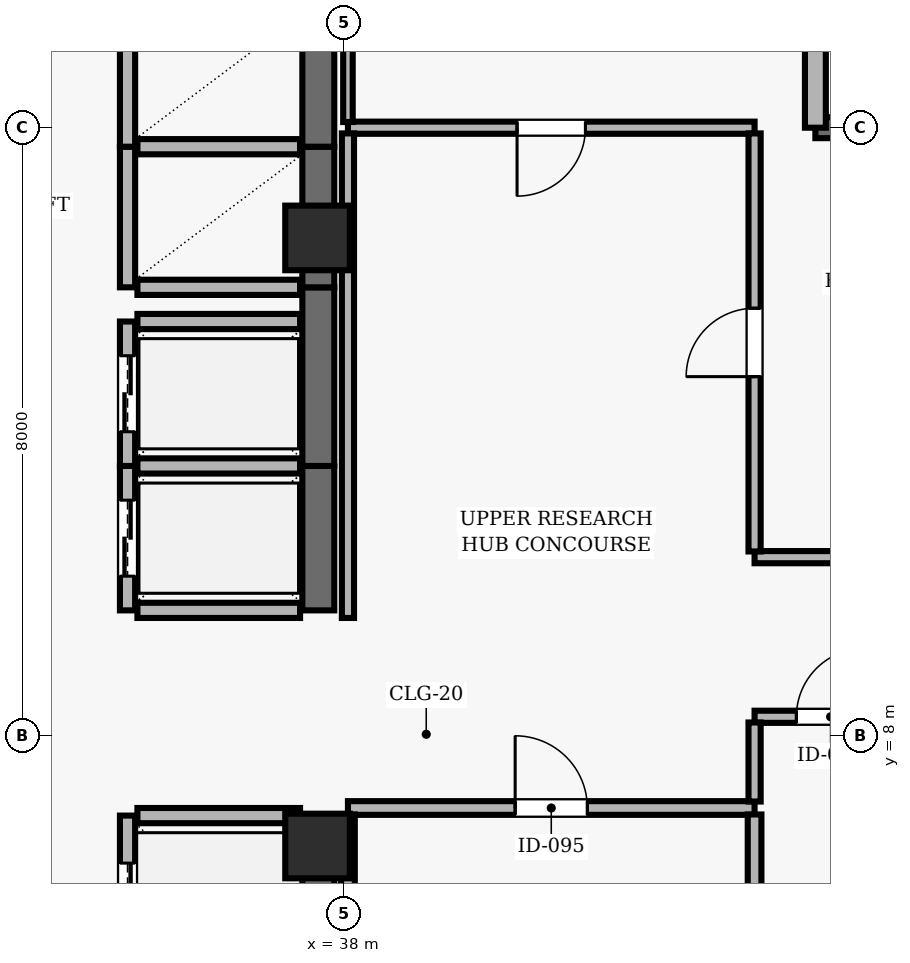
"""IFC4 building model, lengths in metres.
Left out: names, types, materials, properties, quantities, classifications, styles, units other than length and angle.
Written with IfcOpenShell. Run it as: python <this file> out.ifc"""

import sys

from ifc_helpers import new_model, si_unit, direction, frame, frame_2d, origin, origin_2d, place, context, subcontext, project, spatial, rectangle, extrude, element, fill, save


model = new_model("IFC4")
c1 = context("Model", 3, precision=1e-05, world=origin(), true_north=direction((0.0, 1.0)))
c2 = subcontext(c1, "Body", "Model", "MODEL_VIEW")
j1 = project(units=[si_unit("LENGTHUNIT", "METRE"), si_unit("PLANEANGLEUNIT", "RADIAN")], contexts=[c1])
p1 = place(None, origin())
s1 = spatial("IfcSite", under=j1, at=p1, CompositionType="ELEMENT")
p2 = place(p1, origin())
s2 = spatial("IfcBuilding", under=s1, at=p2, CompositionType="ELEMENT")
p3 = place(p2, frame((0.0, 0.0, 271.6)))
s3 = spatial("IfcBuildingStorey", under=s2, at=p3, CompositionType="ELEMENT", Elevation=271.6)
for number, where, z_axis, x_axis in (
    (1, (37.65, 6.55, 0.0), (0.0, 0.0, 1.0), (1.0, 0.0, 0.0)),
    (2, (37.65, 14.55, 0.0), (0.0, 0.0, 1.0), (1.0, 0.0, 0.0)),
):
    element("IfcColumn", number, at=place(p3, frame(where, z_axis=z_axis, x_axis=x_axis)), inside=s3, PredefinedType="COLUMN", context=c2, shape_type="SweptSolid", body=[
        extrude(rectangle(XDim=0.85, YDim=0.85, at=origin_2d()), origin(), (0.0, 0.0, 1.0), 3.9),
    ])
p4 = place(p3, frame((57.3, 16.0, 0.0), z_axis=(0.0, 0.0, 1.0), x_axis=(-1.0, 0.0, 0.0)))
e3 = element("IfcWall", 3, at=p4, inside=s3, PredefinedType="SOLIDWALL", context=c2, shape_type="SweptSolid", body=[
    extrude(rectangle(XDim=13.1, YDim=0.275, at=frame_2d((6.55, 0.0))), origin(), (0.0, 0.0, 1.0), 3.69),
])
p5 = place(p4, frame((7.05, 0.0, 0.0)))
e4 = element("IfcOpeningElement", 4, at=p5, cuts=e3, PredefinedType="OPENING", context=c2, shape_type="SweptSolid", body=[
    extrude(rectangle(XDim=1.0, YDim=2.2, at=frame_2d((0.5, 1.1))), frame((0.0, 0.147, 0.0), z_axis=(0.0, -1.0, 0.0), x_axis=(1.0, 0.0, 0.0)), (0.0, 0.0, 1.0), 0.295),
])
p6 = place(p4, frame((2.075, 0.0, 0.9)))
e5 = element("IfcOpeningElement", 5, at=p6, cuts=e3, PredefinedType="OPENING", context=c2, shape_type="SweptSolid", body=[
    extrude(rectangle(XDim=2.4, YDim=2.2, at=frame_2d((1.2, 1.1))), frame((0.0, 0.147, 0.0), z_axis=(0.0, -1.0, 0.0), x_axis=(1.0, 0.0, 0.0)), (0.0, 0.0, 1.0), 0.295),
])
p7 = place(p3, frame((44.2, 16.0, 0.0), z_axis=(0.0, 0.0, 1.0), x_axis=(0.0, 1.0, 0.0)))
e6 = element("IfcWall", 6, at=p7, inside=s3, PredefinedType="SOLIDWALL", context=c2, shape_type="SweptSolid", body=[
    extrude(rectangle(XDim=5.4, YDim=0.275, at=frame_2d((2.7, 0.0))), origin(), (0.0, 0.0, 1.0), 3.69),
])
p8 = place(p7, frame((1.2, 0.0, 0.9)))
e7 = element("IfcOpeningElement", 7, at=p8, cuts=e6, PredefinedType="OPENING", context=c2, shape_type="SweptSolid", body=[
    extrude(rectangle(XDim=3.0, YDim=2.2, at=frame_2d((1.5, 1.1))), frame((0.0, 0.147, 0.0), z_axis=(0.0, -1.0, 0.0), x_axis=(1.0, 0.0, 0.0)), (0.0, 0.0, 1.0), 0.295),
])
p9 = place(p3, frame((35.15, 6.95, 0.0), z_axis=(0.0, 0.0, 1.0), x_axis=(0.0, -1.0, 0.0)))
e8 = element("IfcWall", 8, at=p9, inside=s3, PredefinedType="SOLIDWALL", context=c2, shape_type="SweptSolid", body=[
    extrude(rectangle(XDim=2.25, YDim=0.2, at=frame_2d((1.125, 0.0))), origin(), (0.0, 0.0, 1.0), 3.69),
])
p10 = place(p9, frame((0.625, 0.0, 0.0)))
e9 = element("IfcOpeningElement", 9, at=p10, cuts=e8, PredefinedType="OPENING", context=c2, shape_type="SweptSolid", body=[
    extrude(rectangle(XDim=1.0, YDim=2.1, at=frame_2d((0.5, 1.05))), frame((0.0, 0.11, 0.0), z_axis=(0.0, -1.0, 0.0), x_axis=(1.0, 0.0, 0.0)), (0.0, 0.0, 1.0), 0.22),
])
p11 = place(p3, frame((37.66, 4.7, 0.0), z_axis=(0.0, 0.0, 1.0), x_axis=(0.0, 1.0, 0.0)))
e10 = element("IfcWall", 10, at=p11, inside=s3, PredefinedType="SHEAR", context=c2, shape_type="SweptSolid", body=[
    extrude(rectangle(XDim=2.25, YDim=0.42, at=frame_2d((1.125, 0.0))), origin(), (0.0, 0.0, 1.0), 3.69),
])
p12 = place(p3, frame((37.42, 6.95, 0.0), z_axis=(0.0, 0.0, 1.0), x_axis=(-1.0, 0.0, 0.0)))
e11 = element("IfcWall", 11, at=p12, inside=s3, PredefinedType="SOLIDWALL", context=c2, shape_type="SweptSolid", body=[
    extrude(rectangle(XDim=2.14, YDim=0.2, at=frame_2d((1.07, 0.0))), origin(), (0.0, 0.0, 1.0), 3.69),
])
p13 = place(p3, frame((35.15, 11.55, 0.0), z_axis=(0.0, 0.0, 1.0), x_axis=(0.0, -1.0, 0.0)))
e12 = element("IfcWall", 12, at=p13, inside=s3, PredefinedType="SOLIDWALL", context=c2, shape_type="SweptSolid", body=[
    extrude(rectangle(XDim=1.9, YDim=0.2, at=frame_2d((0.95, 0.0))), origin(), (0.0, 0.0, 1.0), 3.69),
])
p14 = place(p13, frame((0.45, 0.0, 0.0)))
e13 = element("IfcOpeningElement", 13, at=p14, cuts=e12, PredefinedType="OPENING", context=c2, shape_type="SweptSolid", body=[
    extrude(rectangle(XDim=1.0, YDim=2.1, at=frame_2d((0.5, 1.05))), frame((0.0, 0.11, 0.0), z_axis=(0.0, -1.0, 0.0), x_axis=(1.0, 0.0, 0.0)), (0.0, 0.0, 1.0), 0.22),
])
p15 = place(p3, frame((37.66, 9.65, 0.0), z_axis=(0.0, 0.0, 1.0), x_axis=(0.0, 1.0, 0.0)))
e14 = element("IfcWall", 14, at=p15, inside=s3, PredefinedType="SHEAR", context=c2, shape_type="SweptSolid", body=[
    extrude(rectangle(XDim=1.9, YDim=0.42, at=frame_2d((0.95, 0.0))), origin(), (0.0, 0.0, 1.0), 3.69),
])
for number, where, z_axis, x_axis in (
    (15, (35.28, 9.65, 0.0), (0.0, 0.0, 1.0), (1.0, 0.0, 0.0)),
    (16, (37.42, 11.55, 0.0), (0.0, 0.0, 1.0), (-1.0, 0.0, 0.0)),
):
    element("IfcWall", number, at=place(p3, frame(where, z_axis=z_axis, x_axis=x_axis)), inside=s3, PredefinedType="SOLIDWALL", context=c2, shape_type="SweptSolid", body=[
        extrude(rectangle(XDim=2.14, YDim=0.2, at=frame_2d((1.07, 0.0))), origin(), (0.0, 0.0, 1.0), 3.69),
    ])
p16 = place(p3, frame((35.15, 13.45, 0.0), z_axis=(0.0, 0.0, 1.0), x_axis=(0.0, -1.0, 0.0)))
e17 = element("IfcWall", 17, at=p16, inside=s3, PredefinedType="SOLIDWALL", context=c2, shape_type="SweptSolid", body=[
    extrude(rectangle(XDim=1.9, YDim=0.2, at=frame_2d((0.95, 0.0))), origin(), (0.0, 0.0, 1.0), 3.69),
])
p17 = place(p16, frame((0.45, 0.0, 0.0)))
e18 = element("IfcOpeningElement", 18, at=p17, cuts=e17, PredefinedType="OPENING", context=c2, shape_type="SweptSolid", body=[
    extrude(rectangle(XDim=1.0, YDim=2.1, at=frame_2d((0.5, 1.05))), frame((0.0, 0.11, 0.0), z_axis=(0.0, -1.0, 0.0), x_axis=(1.0, 0.0, 0.0)), (0.0, 0.0, 1.0), 0.22),
])
p18 = place(p3, frame((37.66, 11.55, 0.0), z_axis=(0.0, 0.0, 1.0), x_axis=(0.0, 1.0, 0.0)))
e19 = element("IfcWall", 19, at=p18, inside=s3, PredefinedType="SHEAR", context=c2, shape_type="SweptSolid", body=[
    extrude(rectangle(XDim=2.35, YDim=0.42, at=frame_2d((1.175, 0.0))), origin(), (0.0, 0.0, 1.0), 3.69),
])
p19 = place(p3, frame((37.42, 13.45, 0.0), z_axis=(0.0, 0.0, 1.0), x_axis=(-1.0, 0.0, 0.0)))
e20 = element("IfcWall", 20, at=p19, inside=s3, PredefinedType="SOLIDWALL", context=c2, shape_type="SweptSolid", body=[
    extrude(rectangle(XDim=2.14, YDim=0.2, at=frame_2d((1.07, 0.0))), origin(), (0.0, 0.0, 1.0), 3.69),
])
p20 = place(p3, frame((35.15, 15.75, 0.0), z_axis=(0.0, 0.0, 1.0), x_axis=(0.0, -1.0, 0.0)))
e21 = element("IfcWall", 21, at=p20, inside=s3, PredefinedType="SOLIDWALL", context=c2, shape_type="SweptSolid", body=[
    extrude(rectangle(XDim=1.85, YDim=0.2, at=frame_2d((0.925, 0.0))), origin(), (0.0, 0.0, 1.0), 3.69),
])
p21 = place(p3, frame((37.66, 13.9, 0.0), z_axis=(0.0, 0.0, 1.0), x_axis=(0.0, 1.0, 0.0)))
e22 = element("IfcWall", 22, at=p21, inside=s3, PredefinedType="SHEAR", context=c2, shape_type="SweptSolid", body=[
    extrude(rectangle(XDim=1.85, YDim=0.42, at=frame_2d((0.925, 0.0))), origin(), (0.0, 0.0, 1.0), 3.69),
])
for number, where, z_axis, x_axis in (
    (23, (35.28, 13.9, 0.0), (0.0, 0.0, 1.0), (1.0, 0.0, 0.0)),
    (24, (37.42, 15.75, 0.0), (0.0, 0.0, 1.0), (-1.0, 0.0, 0.0)),
):
    element("IfcWall", number, at=place(p3, frame(where, z_axis=z_axis, x_axis=x_axis)), inside=s3, PredefinedType="SOLIDWALL", context=c2, shape_type="SweptSolid", body=[
        extrude(rectangle(XDim=2.14, YDim=0.2, at=frame_2d((1.07, 0.0))), origin(), (0.0, 0.0, 1.0), 3.69),
    ])
p22 = place(p3, frame((35.15, 17.6, 0.0), z_axis=(0.0, 0.0, 1.0), x_axis=(0.0, -1.0, 0.0)))
e25 = element("IfcWall", 25, at=p22, inside=s3, PredefinedType="SOLIDWALL", context=c2, shape_type="SweptSolid", body=[
    extrude(rectangle(XDim=1.85, YDim=0.2, at=frame_2d((0.925, 0.0))), origin(), (0.0, 0.0, 1.0), 3.69),
])
p23 = place(p3, frame((37.66, 15.75, 0.0), z_axis=(0.0, 0.0, 1.0), x_axis=(0.0, 1.0, 0.0)))
e26 = element("IfcWall", 26, at=p23, inside=s3, PredefinedType="SHEAR", context=c2, shape_type="SweptSolid", body=[
    extrude(rectangle(XDim=1.85, YDim=0.42, at=frame_2d((0.925, 0.0))), origin(), (0.0, 0.0, 1.0), 3.69),
])
p24 = place(p3, frame((38.05, 7.05, 0.0), z_axis=(0.0, 0.0, 1.0), x_axis=(1.0, 0.0, 0.0)))
e27 = element("IfcWall", 27, at=p24, inside=s3, PredefinedType="PARTITIONING", context=c2, shape_type="SweptSolid", body=[
    extrude(rectangle(XDim=5.35, YDim=0.18, at=frame_2d((2.675, 0.0))), origin(), (0.0, 0.0, 1.0), 3.69),
])
p25 = place(p24, frame((2.2, 0.0, 0.0)))
e28 = element("IfcOpeningElement", 28, at=p25, cuts=e27, PredefinedType="OPENING", context=c2, shape_type="SweptSolid", body=[
    extrude(rectangle(XDim=0.95, YDim=2.1, at=frame_2d((0.475, 1.05))), frame((0.0, 0.1, 0.0), z_axis=(0.0, -1.0, 0.0), x_axis=(1.0, 0.0, 0.0)), (0.0, 0.0, 1.0), 0.2),
])
p26 = place(p3, frame((43.4, 8.25, 0.0), z_axis=(0.0, 0.0, 1.0), x_axis=(1.0, 0.0, 0.0)))
e29 = element("IfcWall", 29, at=p26, inside=s3, PredefinedType="PARTITIONING", context=c2, shape_type="SweptSolid", body=[
    extrude(rectangle(XDim=4.1, YDim=0.16, at=frame_2d((2.05, 0.0))), origin(), (0.0, 0.0, 1.0), 3.221),
])
p27 = place(p26, frame((0.55, 0.0, 0.0)))
e30 = element("IfcOpeningElement", 30, at=p27, cuts=e29, PredefinedType="OPENING", context=c2, shape_type="SweptSolid", body=[
    extrude(rectangle(XDim=0.9, YDim=2.1, at=frame_2d((0.45, 1.05))), frame((0.0, 0.09, 0.0), z_axis=(0.0, -1.0, 0.0), x_axis=(1.0, 0.0, 0.0)), (0.0, 0.0, 1.0), 0.18),
])
p28 = place(p3, frame((43.4, 16.0, 0.0), z_axis=(0.0, 0.0, 1.0), x_axis=(-1.0, 0.0, 0.0)))
e31 = element("IfcWall", 31, at=p28, inside=s3, PredefinedType="PARTITIONING", context=c2, shape_type="SweptSolid", body=[
    extrude(rectangle(XDim=5.35, YDim=0.16, at=frame_2d((2.675, 0.0))), origin(), (0.0, 0.0, 1.0), 3.39),
])
p29 = place(p28, frame((2.225, 0.0, 0.0)))
e32 = element("IfcOpeningElement", 32, at=p29, cuts=e31, PredefinedType="OPENING", context=c2, shape_type="SweptSolid", body=[
    extrude(rectangle(XDim=0.9, YDim=2.1, at=frame_2d((0.45, 1.05))), frame((0.0, 0.09, 0.0), z_axis=(0.0, -1.0, 0.0), x_axis=(1.0, 0.0, 0.0)), (0.0, 0.0, 1.0), 0.18),
])
p30 = place(p3, frame((47.5, 10.35, 0.0), z_axis=(0.0, 0.0, 1.0), x_axis=(-1.0, 0.0, 0.0)))
e33 = element("IfcWall", 33, at=p30, inside=s3, PredefinedType="PARTITIONING", context=c2, shape_type="SweptSolid", body=[
    extrude(rectangle(XDim=4.1, YDim=0.16, at=frame_2d((2.05, 0.0))), origin(), (0.0, 0.0, 1.0), 3.372),
])
p31 = place(p3, frame((38.05, 6.965, 0.0), z_axis=(0.0, 0.0, 1.0), x_axis=(0.0, -1.0, 0.0)))
e34 = element("IfcWall", 34, at=p31, inside=s3, PredefinedType="PARTITIONING", context=c2, shape_type="SweptSolid", body=[
    extrude(rectangle(XDim=6.832, YDim=0.18, at=frame_2d((3.416, 0.0))), origin(), (0.0, 0.0, 1.0), 3.221),
])
p32 = place(p3, frame((38.05, 15.925, 0.0), z_axis=(0.0, 0.0, 1.0), x_axis=(0.0, -1.0, 0.0)))
e35 = element("IfcWall", 35, at=p32, inside=s3, PredefinedType="PARTITIONING", context=c2, shape_type="SweptSolid", body=[
    extrude(rectangle(XDim=6.375, YDim=0.16, at=frame_2d((3.188, 0.0))), origin(), (0.0, 0.0, 1.0), 3.221),
])
p33 = place(p3, frame((38.05, 22.468, 0.0), z_axis=(0.0, 0.0, 1.0), x_axis=(0.0, -1.0, 0.0)))
e36 = element("IfcWall", 36, at=p33, inside=s3, PredefinedType="PARTITIONING", context=c2, shape_type="SweptSolid", body=[
    extrude(rectangle(XDim=6.393, YDim=0.125, at=frame_2d((3.197, 0.0))), origin(), (0.0, 0.0, 1.0), 3.221),
])
p34 = place(p3, frame((43.4, 0.133, 0.0), z_axis=(0.0, 0.0, 1.0), x_axis=(0.0, 1.0, 0.0)))
e37 = element("IfcWall", 37, at=p34, inside=s3, PredefinedType="PARTITIONING", context=c2, shape_type="SweptSolid", body=[
    extrude(rectangle(XDim=6.832, YDim=0.18, at=frame_2d((3.416, 0.0))), origin(), (0.0, 0.0, 1.0), 3.69),
])
p35 = place(p3, frame((43.4, 7.135, 0.0), z_axis=(0.0, 0.0, 1.0), x_axis=(0.0, 1.0, 0.0)))
e38 = element("IfcWall", 38, at=p35, inside=s3, PredefinedType="PARTITIONING", context=c2, shape_type="SweptSolid", body=[
    extrude(rectangle(XDim=1.04, YDim=0.16, at=frame_2d((0.52, 0.0))), origin(), (0.0, 0.0, 1.0), 3.69),
])
p36 = place(p3, frame((43.4, 10.425, 0.0), z_axis=(0.0, 0.0, 1.0), x_axis=(0.0, 1.0, 0.0)))
e39 = element("IfcWall", 39, at=p36, inside=s3, PredefinedType="PARTITIONING", context=c2, shape_type="SweptSolid", body=[
    extrude(rectangle(XDim=5.5, YDim=0.16, at=frame_2d((2.75, 0.0))), origin(), (0.0, 0.0, 1.0), 3.69),
])
p37 = place(p36, frame((2.3, 0.0, 0.0)))
e40 = element("IfcOpeningElement", 40, at=p37, cuts=e39, PredefinedType="OPENING", context=c2, shape_type="SweptSolid", body=[
    extrude(rectangle(XDim=0.9, YDim=2.1, at=frame_2d((0.45, 1.05))), frame((0.0, 0.09, 0.0), z_axis=(0.0, -1.0, 0.0), x_axis=(1.0, 0.0, 0.0)), (0.0, 0.0, 1.0), 0.18),
])
p38 = place(p10, origin())
e41 = element("IfcDoor", 41, at=p38, inside=s3, OperationType="DOUBLE_DOOR_SLIDING", PredefinedType="DOOR", context=c2, shape_type="SweptSolid", body=[
    extrude(rectangle(XDim=1.0, YDim=2.1, at=frame_2d((0.5, 1.05))), frame((0.0, 0.025, 0.0), z_axis=(0.0, -1.0, 0.0), x_axis=(1.0, 0.0, 0.0)), (0.0, 0.0, 1.0), 0.05),
])
fill(e9, e41)
p39 = place(p14, origin())
e42 = element("IfcDoor", 42, at=p39, inside=s3, OperationType="DOUBLE_DOOR_SLIDING", PredefinedType="DOOR", context=c2, shape_type="SweptSolid", body=[
    extrude(rectangle(XDim=1.0, YDim=2.1, at=frame_2d((0.5, 1.05))), frame((0.0, 0.025, 0.0), z_axis=(0.0, -1.0, 0.0), x_axis=(1.0, 0.0, 0.0)), (0.0, 0.0, 1.0), 0.05),
])
fill(e13, e42)
p40 = place(p17, origin())
e43 = element("IfcDoor", 43, at=p40, inside=s3, OperationType="DOUBLE_DOOR_SLIDING", PredefinedType="DOOR", context=c2, shape_type="SweptSolid", body=[
    extrude(rectangle(XDim=1.0, YDim=2.1, at=frame_2d((0.5, 1.05))), frame((0.0, 0.025, 0.0), z_axis=(0.0, -1.0, 0.0), x_axis=(1.0, 0.0, 0.0)), (0.0, 0.0, 1.0), 0.05),
])
fill(e18, e43)
p41 = place(p25, origin())
e44 = element("IfcDoor", 44, at=p41, inside=s3, OperationType="SINGLE_SWING_LEFT", PredefinedType="DOOR", context=c2, shape_type="SweptSolid", body=[
    extrude(rectangle(XDim=0.95, YDim=2.1, at=frame_2d((0.475, 1.05))), frame((0.0, 0.025, 0.0), z_axis=(0.0, -1.0, 0.0), x_axis=(1.0, 0.0, 0.0)), (0.0, 0.0, 1.0), 0.05),
])
fill(e28, e44)
p42 = place(p27, origin())
e45 = element("IfcDoor", 45, at=p42, inside=s3, OperationType="SINGLE_SWING_RIGHT", PredefinedType="DOOR", context=c2, shape_type="SweptSolid", body=[
    extrude(rectangle(XDim=0.9, YDim=2.1, at=frame_2d((0.45, 1.05))), frame((0.0, 0.025, 0.0), z_axis=(0.0, -1.0, 0.0), x_axis=(1.0, 0.0, 0.0)), (0.0, 0.0, 1.0), 0.05),
])
fill(e30, e45)
p43 = place(p37, origin())
e46 = element("IfcDoor", 46, at=p43, inside=s3, OperationType="SINGLE_SWING_LEFT", PredefinedType="DOOR", context=c2, shape_type="SweptSolid", body=[
    extrude(rectangle(XDim=0.9, YDim=2.1, at=frame_2d((0.45, 1.05))), frame((0.0, 0.025, 0.0), z_axis=(0.0, -1.0, 0.0), x_axis=(1.0, 0.0, 0.0)), (0.0, 0.0, 1.0), 0.05),
])
fill(e40, e46)
p44 = place(p29, origin())
e47 = element("IfcDoor", 47, at=p44, inside=s3, OperationType="SINGLE_SWING_RIGHT", PredefinedType="DOOR", context=c2, shape_type="SweptSolid", body=[
    extrude(rectangle(XDim=0.9, YDim=2.1, at=frame_2d((0.45, 1.05))), frame((0.0, 0.025, 0.0), z_axis=(0.0, -1.0, 0.0), x_axis=(1.0, 0.0, 0.0)), (0.0, 0.0, 1.0), 0.05),
])
fill(e32, e47)
save(model, sys.argv[1])
